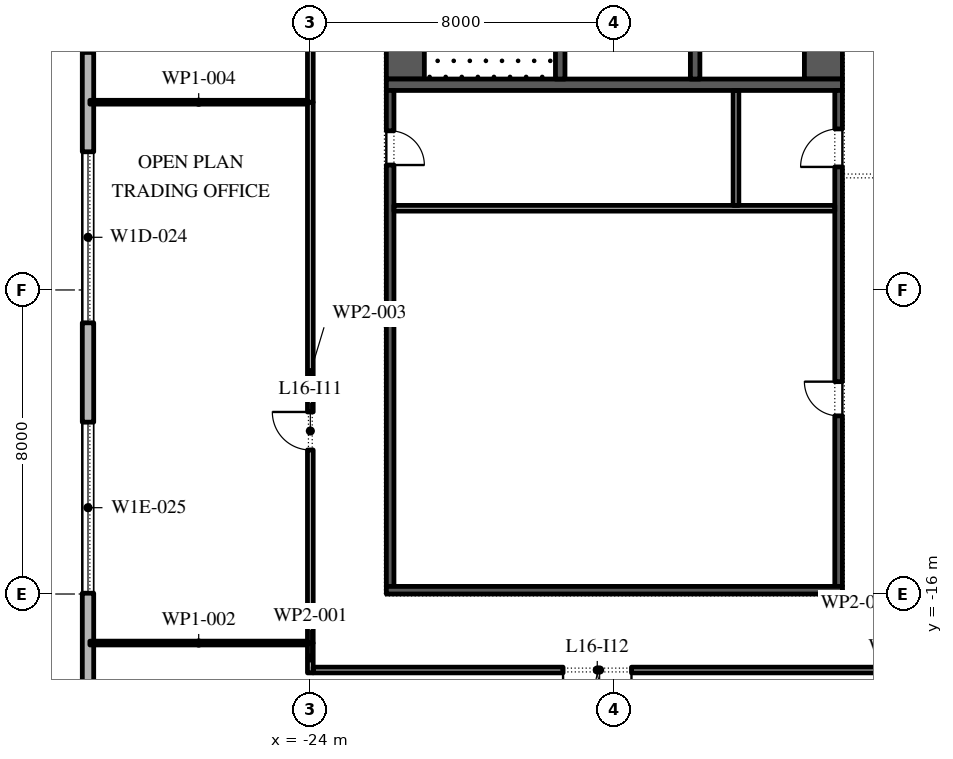
"""IFC4 building model, lengths in metres.
Left out: names, types, materials, properties, quantities, classifications, styles, units other than length and angle.
Written with IfcOpenShell. Run it as: python <this file> out.ifc"""

import sys

from ifc_helpers import new_model, si_unit, direction, frame, frame_2d, origin, place, context, subcontext, project, spatial, rectangle, extrude, element, fill, save


model = new_model("IFC4")
c1 = context("Model", 3, precision=1e-05, world=origin(), true_north=direction((0.0, 1.0)))
c2 = subcontext(c1, "Body", "Model", "MODEL_VIEW")
j1 = project(units=[si_unit("LENGTHUNIT", "METRE"), si_unit("PLANEANGLEUNIT", "RADIAN")], contexts=[c1])
p1 = place(None, origin())
s1 = spatial("IfcSite", under=j1, at=p1, CompositionType="ELEMENT")
p2 = place(p1, origin())
s2 = spatial("IfcBuilding", under=s1, at=p2, CompositionType="ELEMENT")
p3 = place(p2, frame((0.0, 0.0, 77.4)))
s3 = spatial("IfcBuildingStorey", under=s2, at=p3, CompositionType="ELEMENT", Elevation=77.4)
p4 = place(p3, frame((-29.85, 25.1, 0.0), z_axis=(0.0, 0.0, 1.0), x_axis=(0.0, -1.0, 0.0)))
e1 = element("IfcWall", 1, at=p4, inside=s3, PredefinedType="STANDARD", context=c2, shape_type="SweptSolid", body=[
    extrude(rectangle(XDim=49.5, YDim=0.3, at=frame_2d((24.75, 0.0))), origin(), (0.0, 0.0, 1.0), 4.0),
])
p5 = place(p4, frame((1.157, 0.0, 0.45)))
e2 = element("IfcOpeningElement", 2, at=p5, cuts=e1, PredefinedType="OPENING", context=c2, shape_type="SweptSolid", body=[
    extrude(rectangle(XDim=4.5, YDim=2.875, at=frame_2d((2.25, 1.438))), frame((0.0, 0.16, 0.0), z_axis=(0.0, -1.0, 0.0), x_axis=(1.0, 0.0, 0.0)), (0.0, 0.0, 1.0), 0.32),
])
p6 = place(p4, frame((8.121, 0.0, 0.45)))
e3 = element("IfcOpeningElement", 3, at=p6, cuts=e1, PredefinedType="OPENING", context=c2, shape_type="SweptSolid", body=[
    extrude(rectangle(XDim=4.5, YDim=3.05, at=frame_2d((2.25, 1.525))), frame((0.0, 0.16, 0.0), z_axis=(0.0, -1.0, 0.0), x_axis=(1.0, 0.0, 0.0)), (0.0, 0.0, 1.0), 0.32),
])
p7 = place(p4, frame((16.286, 0.0, 0.0)))
e4 = element("IfcOpeningElement", 4, at=p7, cuts=e1, PredefinedType="OPENING", context=c2, shape_type="SweptSolid", body=[
    extrude(rectangle(XDim=2.4, YDim=3.325, at=frame_2d((1.2, 1.663))), frame((0.0, 0.16, 0.0), z_axis=(0.0, -1.0, 0.0), x_axis=(1.0, 0.0, 0.0)), (0.0, 0.0, 1.0), 0.32),
])
p8 = place(p4, frame((22.35, 0.0, 0.45)))
e5 = element("IfcOpeningElement", 5, at=p8, cuts=e1, PredefinedType="OPENING", context=c2, shape_type="SweptSolid", body=[
    extrude(rectangle(XDim=4.5, YDim=2.875, at=frame_2d((2.25, 1.438))), frame((0.0, 0.16, 0.0), z_axis=(0.0, -1.0, 0.0), x_axis=(1.0, 0.0, 0.0)), (0.0, 0.0, 1.0), 0.32),
])
p9 = place(p4, frame((29.464, 0.0, 0.45)))
e6 = element("IfcOpeningElement", 6, at=p9, cuts=e1, PredefinedType="OPENING", context=c2, shape_type="SweptSolid", body=[
    extrude(rectangle(XDim=4.5, YDim=2.875, at=frame_2d((2.25, 1.438))), frame((0.0, 0.16, 0.0), z_axis=(0.0, -1.0, 0.0), x_axis=(1.0, 0.0, 0.0)), (0.0, 0.0, 1.0), 0.32),
])
p10 = place(p4, frame((36.579, 0.0, 0.45)))
e7 = element("IfcOpeningElement", 7, at=p10, cuts=e1, PredefinedType="OPENING", context=c2, shape_type="SweptSolid", body=[
    extrude(rectangle(XDim=4.5, YDim=2.825, at=frame_2d((2.25, 1.413))), frame((0.0, 0.16, 0.0), z_axis=(0.0, -1.0, 0.0), x_axis=(1.0, 0.0, 0.0)), (0.0, 0.0, 1.0), 0.32),
])
p11 = place(p4, frame((44.743, 0.0, 0.0)))
e8 = element("IfcOpeningElement", 8, at=p11, cuts=e1, PredefinedType="OPENING", context=c2, shape_type="SweptSolid", body=[
    extrude(rectangle(XDim=2.4, YDim=3.5, at=frame_2d((1.2, 1.75))), frame((0.0, 0.16, 0.0), z_axis=(0.0, -1.0, 0.0), x_axis=(1.0, 0.0, 0.0)), (0.0, 0.0, 1.0), 0.32),
])
p12 = place(p3, frame((-21.5, -2.45, 0.0), z_axis=(0.0, 0.0, 1.0), x_axis=(0.0, 1.0, 0.0)))
e9 = element("IfcWall", 9, at=p12, inside=s3, PredefinedType="SHEAR", context=c2, shape_type="SweptSolid", body=[
    extrude(rectangle(XDim=27.9, YDim=1.0, at=frame_2d((13.95, 0.0))), origin(), (0.0, 0.0, 1.0), 4.0),
])
p13 = place(p12, frame((5.05, 0.0, 0.0)))
e10 = element("IfcOpeningElement", 10, at=p13, cuts=e9, PredefinedType="OPENING", context=c2, shape_type="SweptSolid", body=[
    extrude(rectangle(XDim=1.2, YDim=2.1, at=frame_2d((0.6, 1.05))), frame((0.0, 0.51, 0.0), z_axis=(0.0, -1.0, 0.0), x_axis=(1.0, 0.0, 0.0)), (0.0, 0.0, 1.0), 1.02),
])
p14 = place(p12, frame((21.65, 0.0, 0.0)))
e11 = element("IfcOpeningElement", 11, at=p14, cuts=e9, PredefinedType="OPENING", context=c2, shape_type="SweptSolid", body=[
    extrude(rectangle(XDim=1.2, YDim=2.1, at=frame_2d((0.6, 1.05))), frame((0.0, 0.51, 0.0), z_axis=(0.0, -1.0, 0.0), x_axis=(1.0, 0.0, 0.0)), (0.0, 0.0, 1.0), 1.02),
])
p15 = place(p3, frame((-10.5, -2.45, 0.0), z_axis=(0.0, 0.0, 1.0), x_axis=(0.0, 1.0, 0.0)))
e12 = element("IfcWall", 12, at=p15, inside=s3, PredefinedType="SHEAR", context=c2, shape_type="SweptSolid", body=[
    extrude(rectangle(XDim=27.9, YDim=1.0, at=frame_2d((13.95, 0.0))), origin(), (0.0, 0.0, 1.0), 4.0),
])
p16 = place(p15, frame((23.65, 0.0, 0.0)))
e13 = element("IfcOpeningElement", 13, at=p16, cuts=e12, PredefinedType="OPENING", context=c2, shape_type="SweptSolid", body=[
    extrude(rectangle(XDim=2.4, YDim=2.1, at=frame_2d((1.2, 1.05))), frame((0.0, 0.51, 0.0), z_axis=(0.0, -1.0, 0.0), x_axis=(1.0, 0.0, 0.0)), (0.0, 0.0, 1.0), 1.02),
])
p17 = place(p15, frame((1.387, 0.0, 0.0)))
e14 = element("IfcOpeningElement", 14, at=p17, cuts=e12, PredefinedType="OPENING", context=c2, shape_type="SweptSolid", body=[
    extrude(rectangle(XDim=0.9, YDim=2.1, at=frame_2d((0.45, 1.05))), frame((0.0, 0.51, 0.0), z_axis=(0.0, -1.0, 0.0), x_axis=(1.0, 0.0, 0.0)), (0.0, 0.0, 1.0), 1.02),
])
p18 = place(p15, frame((4.613, 0.0, 0.0)))
e15 = element("IfcOpeningElement", 15, at=p18, cuts=e12, PredefinedType="OPENING", context=c2, shape_type="SweptSolid", body=[
    extrude(rectangle(XDim=0.9, YDim=2.1, at=frame_2d((0.45, 1.05))), frame((0.0, 0.51, 0.0), z_axis=(0.0, -1.0, 0.0), x_axis=(1.0, 0.0, 0.0)), (0.0, 0.0, 1.0), 1.02),
])
p19 = place(p3, frame((-22.0, -2.6, 0.0), z_axis=(0.0, 0.0, 1.0), x_axis=(1.0, 0.0, 0.0)))
e16 = element("IfcWall", 16, at=p19, inside=s3, PredefinedType="SHEAR", context=c2, shape_type="SweptSolid", body=[
    extrude(rectangle(XDim=12.0, YDim=0.3, at=frame_2d((6.0, 0.0))), origin(), (0.0, 0.0, 1.0), 4.0),
])
p20 = place(p3, frame((-17.425, -2.45, 0.0), z_axis=(0.0, 0.0, 1.0), x_axis=(0.0, 1.0, 0.0)))
e17 = element("IfcWall", 17, at=p20, inside=s3, PredefinedType="SHEAR", context=c2, shape_type="SweptSolid", body=[
    extrude(rectangle(XDim=6.3, YDim=0.25, at=frame_2d((3.15, 0.0))), origin(), (0.0, 0.0, 1.0), 4.0),
])
p21 = place(p20, frame((5.05, 0.0, 0.0)))
e18 = element("IfcOpeningElement", 18, at=p21, cuts=e17, PredefinedType="OPENING", context=c2, shape_type="SweptSolid", body=[
    extrude(rectangle(XDim=1.2, YDim=2.1, at=frame_2d((0.6, 1.05))), frame((0.0, 0.135, 0.0), z_axis=(0.0, -1.0, 0.0), x_axis=(1.0, 0.0, 0.0)), (0.0, 0.0, 1.0), 0.27),
])
p22 = place(p3, frame((-13.875, -2.45, 0.0), z_axis=(0.0, 0.0, 1.0), x_axis=(0.0, 1.0, 0.0)))
e19 = element("IfcWall", 19, at=p22, inside=s3, PredefinedType="SHEAR", context=c2, shape_type="SweptSolid", body=[
    extrude(rectangle(XDim=21.3, YDim=0.25, at=frame_2d((10.65, 0.0))), origin(), (0.0, 0.0, 1.0), 4.0),
])
p23 = place(p22, frame((11.446, 0.0, 0.0)))
e20 = element("IfcOpeningElement", 20, at=p23, cuts=e19, PredefinedType="OPENING", context=c2, shape_type="SweptSolid", body=[
    extrude(rectangle(XDim=0.9, YDim=2.1, at=frame_2d((0.45, 1.05))), frame((0.0, 0.135, 0.0), z_axis=(0.0, -1.0, 0.0), x_axis=(1.0, 0.0, 0.0)), (0.0, 0.0, 1.0), 0.27),
])
p24 = place(p22, frame((17.725, 0.0, 0.0)))
e21 = element("IfcOpeningElement", 21, at=p24, cuts=e19, PredefinedType="OPENING", context=c2, shape_type="SweptSolid", body=[
    extrude(rectangle(XDim=0.9, YDim=2.1, at=frame_2d((0.45, 1.05))), frame((0.0, 0.135, 0.0), z_axis=(0.0, -1.0, 0.0), x_axis=(1.0, 0.0, 0.0)), (0.0, 0.0, 1.0), 0.27),
])
p25 = place(p22, frame((6.971, 0.0, 0.0)))
e22 = element("IfcOpeningElement", 22, at=p25, cuts=e19, PredefinedType="OPENING", context=c2, shape_type="SweptSolid", body=[
    extrude(rectangle(XDim=1.1, YDim=2.1, at=frame_2d((0.55, 1.05))), frame((0.0, 0.135, 0.0), z_axis=(0.0, -1.0, 0.0), x_axis=(1.0, 0.0, 0.0)), (0.0, 0.0, 1.0), 0.27),
])
p26 = place(p3, frame((-21.9, -15.8, 0.0), z_axis=(0.0, 0.0, 1.0), x_axis=(0.0, 1.0, 0.0)))
e23 = element("IfcWall", 23, at=p26, inside=s3, PredefinedType="SHEAR", context=c2, shape_type="SweptSolid", body=[
    extrude(rectangle(XDim=13.05, YDim=0.2, at=frame_2d((6.525, 0.0))), origin(), (0.0, 0.0, 1.0), 4.0),
])
p27 = place(p26, frame((11.087, 0.0, 0.0)))
e24 = element("IfcOpeningElement", 24, at=p27, cuts=e23, PredefinedType="OPENING", context=c2, shape_type="SweptSolid", body=[
    extrude(rectangle(XDim=0.9, YDim=2.1, at=frame_2d((0.45, 1.05))), frame((0.0, 0.11, 0.0), z_axis=(0.0, -1.0, 0.0), x_axis=(1.0, 0.0, 0.0)), (0.0, 0.0, 1.0), 0.22),
])
p28 = place(p3, frame((-10.1, -15.8, 0.0), z_axis=(0.0, 0.0, 1.0), x_axis=(0.0, 1.0, 0.0)))
e25 = element("IfcWall", 25, at=p28, inside=s3, PredefinedType="SHEAR", context=c2, shape_type="SweptSolid", body=[
    extrude(rectangle(XDim=13.05, YDim=0.2, at=frame_2d((6.525, 0.0))), origin(), (0.0, 0.0, 1.0), 4.0),
])
p29 = place(p28, frame((4.488, 0.0, 0.0)))
e26 = element("IfcOpeningElement", 26, at=p29, cuts=e25, PredefinedType="OPENING", context=c2, shape_type="SweptSolid", body=[
    extrude(rectangle(XDim=0.9, YDim=2.1, at=frame_2d((0.45, 1.05))), frame((0.0, 0.11, 0.0), z_axis=(0.0, -1.0, 0.0), x_axis=(1.0, 0.0, 0.0)), (0.0, 0.0, 1.0), 0.22),
])
p30 = place(p28, frame((11.038, 0.0, 0.0)))
e27 = element("IfcOpeningElement", 27, at=p30, cuts=e25, PredefinedType="OPENING", context=c2, shape_type="SweptSolid", body=[
    extrude(rectangle(XDim=1.0, YDim=2.1, at=frame_2d((0.5, 1.05))), frame((0.0, 0.11, 0.0), z_axis=(0.0, -1.0, 0.0), x_axis=(1.0, 0.0, 0.0)), (0.0, 0.0, 1.0), 0.22),
])
p31 = place(p3, frame((-22.0, -15.9, 0.0), z_axis=(0.0, 0.0, 1.0), x_axis=(1.0, 0.0, 0.0)))
e28 = element("IfcWall", 28, at=p31, inside=s3, PredefinedType="SHEAR", context=c2, shape_type="SweptSolid", body=[
    extrude(rectangle(XDim=12.0, YDim=0.2, at=frame_2d((6.0, 0.0))), origin(), (0.0, 0.0, 1.0), 4.0),
])
p32 = place(p3, frame((-21.8, -5.85, 0.0), z_axis=(0.0, 0.0, 1.0), x_axis=(1.0, 0.0, 0.0)))
e29 = element("IfcWall", 29, at=p32, inside=s3, PredefinedType="PARTITIONING", context=c2, shape_type="SweptSolid", body=[
    extrude(rectangle(XDim=11.6, YDim=0.15, at=frame_2d((5.8, 0.0))), origin(), (0.0, 0.0, 1.0), 4.0),
])
p33 = place(p3, frame((-12.8, -5.775, 0.0), z_axis=(0.0, 0.0, 1.0), x_axis=(0.0, 1.0, 0.0)))
e30 = element("IfcWall", 30, at=p33, inside=s3, PredefinedType="PARTITIONING", context=c2, shape_type="SweptSolid", body=[
    extrude(rectangle(XDim=3.025, YDim=0.15, at=frame_2d((1.512, 0.0))), origin(), (0.0, 0.0, 1.0), 4.0),
])
p34 = place(p3, frame((-24.0, -18.075, 0.0), z_axis=(0.0, 0.0, 1.0), x_axis=(0.0, 1.0, 0.0)))
e31 = element("IfcWall", 31, at=p34, inside=s3, PredefinedType="PARTITIONING", context=c2, shape_type="SweptSolid", body=[
    extrude(rectangle(XDim=0.785, YDim=0.15, at=frame_2d((0.393, 0.0))), origin(), (0.0, 0.0, 1.0), 4.0),
])
p35 = place(p3, frame((-24.075, -17.29, 0.0), z_axis=(0.0, 0.0, 1.0), x_axis=(-1.0, 0.0, 0.0)))
e32 = element("IfcWall", 32, at=p35, inside=s3, PredefinedType="PARTITIONING", context=c2, shape_type="SweptSolid", body=[
    extrude(rectangle(XDim=5.725, YDim=0.1, at=frame_2d((2.863, 0.0))), origin(), (0.0, 0.0, 1.0), 4.0),
])
p36 = place(p3, frame((-24.0, -17.29, 0.0), z_axis=(0.0, 0.0, 1.0), x_axis=(0.0, 1.0, 0.0)))
e33 = element("IfcWall", 33, at=p36, inside=s3, PredefinedType="PARTITIONING", context=c2, shape_type="SweptSolid", body=[
    extrude(rectangle(XDim=14.23, YDim=0.15, at=frame_2d((7.115, 0.0))), origin(), (0.0, 0.0, 1.0), 4.0),
])
p37 = place(p36, frame((5.08, 0.0, 0.0)))
e34 = element("IfcOpeningElement", 34, at=p37, cuts=e33, PredefinedType="OPENING", context=c2, shape_type="SweptSolid", body=[
    extrude(rectangle(XDim=1.0, YDim=2.1, at=frame_2d((0.5, 1.05))), frame((0.0, 0.085, 0.0), z_axis=(0.0, -1.0, 0.0), x_axis=(1.0, 0.0, 0.0)), (0.0, 0.0, 1.0), 0.17),
])
p38 = place(p3, frame((-24.075, -3.06, 0.0), z_axis=(0.0, 0.0, 1.0), x_axis=(-1.0, 0.0, 0.0)))
e35 = element("IfcWall", 35, at=p38, inside=s3, PredefinedType="PARTITIONING", context=c2, shape_type="SweptSolid", body=[
    extrude(rectangle(XDim=5.725, YDim=0.1, at=frame_2d((2.863, 0.0))), origin(), (0.0, 0.0, 1.0), 4.0),
])
p39 = place(p3, frame((-24.0, -3.06, 0.0), z_axis=(0.0, 0.0, 1.0), x_axis=(0.0, 1.0, 0.0)))
e36 = element("IfcWall", 36, at=p39, inside=s3, PredefinedType="PARTITIONING", context=c2, shape_type="SweptSolid", body=[
    extrude(rectangle(XDim=30.345, YDim=0.15, at=frame_2d((15.172, 0.0))), origin(), (0.0, 0.0, 1.0), 4.0),
])
p40 = place(p39, frame((17.62, 0.0, 0.0)))
e37 = element("IfcOpeningElement", 37, at=p40, cuts=e36, PredefinedType="OPENING", context=c2, shape_type="SweptSolid", body=[
    extrude(rectangle(XDim=1.0, YDim=2.1, at=frame_2d((0.5, 1.05))), frame((0.0, 0.085, 0.0), z_axis=(0.0, -1.0, 0.0), x_axis=(1.0, 0.0, 0.0)), (0.0, 0.0, 1.0), 0.17),
])
p41 = place(p3, frame((-8.85, -18.0, 0.0), z_axis=(0.0, 0.0, 1.0), x_axis=(-1.0, 0.0, 0.0)))
e38 = element("IfcWall", 38, at=p41, inside=s3, PredefinedType="PARTITIONING", context=c2, shape_type="SweptSolid", body=[
    extrude(rectangle(XDim=15.075, YDim=0.15, at=frame_2d((7.538, 0.0))), origin(), (0.0, 0.0, 1.0), 4.0),
])
p42 = place(p41, frame((6.7, 0.0, 0.0)))
e39 = element("IfcOpeningElement", 39, at=p42, cuts=e38, PredefinedType="OPENING", context=c2, shape_type="SweptSolid", body=[
    extrude(rectangle(XDim=1.8, YDim=2.1, at=frame_2d((0.9, 1.05))), frame((0.0, 0.085, 0.0), z_axis=(0.0, -1.0, 0.0), x_axis=(1.0, 0.0, 0.0)), (0.0, 0.0, 1.0), 0.17),
])
p43 = place(p9, origin())
e40 = element("IfcWindow", 40, at=p43, inside=s3, PartitioningType="DOUBLE_PANEL_VERTICAL", PredefinedType="WINDOW", context=c2, shape_type="SweptSolid", body=[
    extrude(rectangle(XDim=4.5, YDim=2.875, at=frame_2d((2.25, 1.438))), frame((0.0, 0.03, 0.0), z_axis=(0.0, -1.0, 0.0), x_axis=(1.0, 0.0, 0.0)), (0.0, 0.0, 1.0), 0.06),
])
fill(e6, e40)
p44 = place(p10, origin())
e41 = element("IfcWindow", 41, at=p44, inside=s3, PartitioningType="DOUBLE_PANEL_VERTICAL", PredefinedType="WINDOW", context=c2, shape_type="SweptSolid", body=[
    extrude(rectangle(XDim=4.5, YDim=2.825, at=frame_2d((2.25, 1.413))), frame((0.0, 0.03, 0.0), z_axis=(0.0, -1.0, 0.0), x_axis=(1.0, 0.0, 0.0)), (0.0, 0.0, 1.0), 0.06),
])
fill(e7, e41)
p45 = place(p29, origin())
e42 = element("IfcDoor", 42, at=p45, inside=s3, OperationType="SINGLE_SWING_LEFT", PredefinedType="DOOR", context=c2, shape_type="SweptSolid", body=[
    extrude(rectangle(XDim=0.9, YDim=2.1, at=frame_2d((0.45, 1.05))), frame((0.0, 0.1, 0.0), z_axis=(0.0, -1.0, 0.0), x_axis=(1.0, 0.0, 0.0)), (0.0, 0.0, 1.0), 0.05),
])
fill(e26, e42)
p46 = place(p30, origin())
e43 = element("IfcDoor", 43, at=p46, inside=s3, OperationType="SINGLE_SWING_RIGHT", PredefinedType="DOOR", context=c2, shape_type="SweptSolid", body=[
    extrude(rectangle(XDim=1.0, YDim=2.1, at=frame_2d((0.5, 1.05))), frame((0.0, 0.1, 0.0), z_axis=(0.0, -1.0, 0.0), x_axis=(1.0, 0.0, 0.0)), (0.0, 0.0, 1.0), 0.05),
])
fill(e27, e43)
p47 = place(p27, frame((0.9, -0.15, 0.0), z_axis=(0.0, 0.0, 1.0), x_axis=(-1.0, 0.0, 0.0)))
e44 = element("IfcDoor", 44, at=p47, inside=s3, OperationType="SINGLE_SWING_LEFT", PredefinedType="DOOR", context=c2, shape_type="SweptSolid", body=[
    extrude(rectangle(XDim=0.9, YDim=2.1, at=frame_2d((0.45, 1.05))), frame((0.0, -0.05, 0.0), z_axis=(0.0, -1.0, 0.0), x_axis=(1.0, 0.0, 0.0)), (0.0, 0.0, 1.0), 0.05),
])
fill(e24, e44)
p48 = place(p37, origin())
e45 = element("IfcDoor", 45, at=p48, inside=s3, OperationType="SINGLE_SWING_LEFT", PredefinedType="DOOR", context=c2, shape_type="SweptSolid", body=[
    extrude(rectangle(XDim=1.0, YDim=2.1, at=frame_2d((0.5, 1.05))), frame((0.0, 0.025, 0.0), z_axis=(0.0, -1.0, 0.0), x_axis=(1.0, 0.0, 0.0)), (0.0, 0.0, 1.0), 0.05),
])
fill(e34, e45)
p49 = place(p42, origin())
e46 = element("IfcDoor", 46, at=p49, inside=s3, OperationType="SINGLE_SWING_LEFT", PredefinedType="DOOR", context=c2, shape_type="SweptSolid", body=[
    extrude(rectangle(XDim=1.8, YDim=2.1, at=frame_2d((0.9, 1.05))), frame((0.0, 0.025, 0.0), z_axis=(0.0, -1.0, 0.0), x_axis=(1.0, 0.0, 0.0)), (0.0, 0.0, 1.0), 0.05),
])
fill(e39, e46)
save(model, sys.argv[1])
